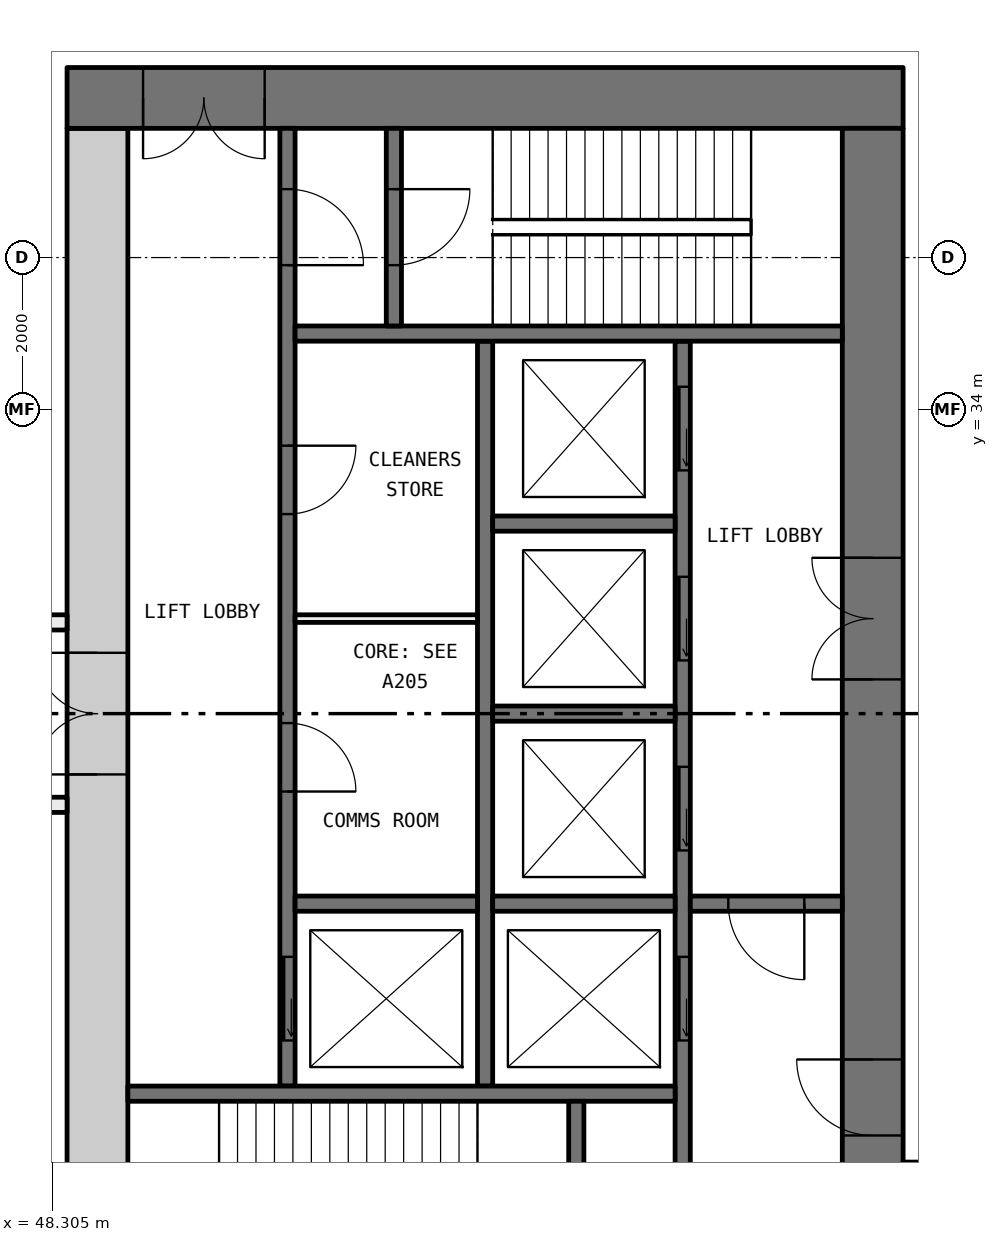
"""IFC4 building model, lengths in metres.
Left out: names, types, materials, properties, quantities, classifications, styles, units other than length and angle.
Written with IfcOpenShell. Run it as: python <this file> out.ifc"""

import sys

from ifc_helpers import new_model, si_unit, direction, frame, frame_2d, origin, place, context, subcontext, project, spatial, rectangle, extrude, element, fill, save


model = new_model("IFC4")
c1 = context("Model", 3, precision=1e-05, world=origin(), true_north=direction((0.0, 1.0)))
c2 = subcontext(c1, "Body", "Model", "MODEL_VIEW")
j1 = project(units=[si_unit("LENGTHUNIT", "METRE"), si_unit("PLANEANGLEUNIT", "RADIAN")], contexts=[c1])
p1 = place(None, origin())
s1 = spatial("IfcSite", under=j1, at=p1, CompositionType="ELEMENT")
p2 = place(p1, origin())
s2 = spatial("IfcBuilding", under=s1, at=p2, CompositionType="ELEMENT")
p3 = place(p2, frame((0.0, 0.0, 24.0)))
s3 = spatial("IfcBuildingStorey", under=s2, at=p3, CompositionType="ELEMENT", Elevation=24.0)
p4 = place(p3, frame((42.0, 28.8, 0.0), z_axis=(0.0, 0.0, 1.0), x_axis=(1.0, 0.0, 0.0)))
e1 = element("IfcWall", 1, at=p4, inside=s3, PredefinedType="PARTITIONING", context=c2, shape_type="SweptSolid", body=[
    extrude(rectangle(XDim=6.5, YDim=0.2, at=frame_2d((3.25, 0.0))), origin(), (0.0, 0.0, 1.0), 5.6),
])
p5 = place(p4, frame((2.65, 0.0, 0.0)))
e2 = element("IfcOpeningElement", 2, at=p5, cuts=e1, PredefinedType="OPENING", context=c2, shape_type="SweptSolid", body=[
    extrude(rectangle(XDim=1.2, YDim=2.1, at=frame_2d((0.6, 1.05))), frame((0.0, 0.11, 0.0), z_axis=(0.0, -1.0, 0.0), x_axis=(1.0, 0.0, 0.0)), (0.0, 0.0, 1.0), 0.22),
])
p6 = place(p3, frame((48.5, 31.2, 0.0), z_axis=(0.0, 0.0, 1.0), x_axis=(-1.0, 0.0, 0.0)))
e3 = element("IfcWall", 3, at=p6, inside=s3, PredefinedType="PARTITIONING", context=c2, shape_type="SweptSolid", body=[
    extrude(rectangle(XDim=6.5, YDim=0.2, at=frame_2d((3.25, 0.0))), origin(), (0.0, 0.0, 1.0), 5.6),
])
p7 = place(p6, frame((2.65, 0.0, 0.0)))
e4 = element("IfcOpeningElement", 4, at=p7, cuts=e3, PredefinedType="OPENING", context=c2, shape_type="SweptSolid", body=[
    extrude(rectangle(XDim=1.2, YDim=2.1, at=frame_2d((0.6, 1.05))), frame((0.0, 0.11, 0.0), z_axis=(0.0, -1.0, 0.0), x_axis=(1.0, 0.0, 0.0)), (0.0, 0.0, 1.0), 0.22),
])
p8 = place(p3, frame((59.5, 38.1, 0.0), z_axis=(0.0, 0.0, 1.0), x_axis=(-1.0, 0.0, 0.0)))
e5 = element("IfcWall", 5, at=p8, inside=s3, PredefinedType="SHEAR", context=c2, shape_type="SweptSolid", body=[
    extrude(rectangle(XDim=11.0, YDim=0.8, at=frame_2d((5.5, 0.0))), origin(), (0.0, 0.0, 1.0), 5.6),
])
p9 = place(p8, frame((8.4, 0.0, 0.0)))
e6 = element("IfcOpeningElement", 6, at=p9, cuts=e5, PredefinedType="OPENING", context=c2, shape_type="SweptSolid", body=[
    extrude(rectangle(XDim=1.6, YDim=2.1, at=frame_2d((0.8, 1.05))), frame((0.0, 0.41, 0.0), z_axis=(0.0, -1.0, 0.0), x_axis=(1.0, 0.0, 0.0)), (0.0, 0.0, 1.0), 0.82),
])
p10 = place(p3, frame((59.1, 22.3, 0.0), z_axis=(0.0, 0.0, 1.0), x_axis=(0.0, 1.0, 0.0)))
e7 = element("IfcWall", 7, at=p10, inside=s3, PredefinedType="SHEAR", context=c2, shape_type="SweptSolid", body=[
    extrude(rectangle(XDim=15.4, YDim=0.8, at=frame_2d((7.7, 0.0))), origin(), (0.0, 0.0, 1.0), 5.6),
])
p11 = place(p10, frame((8.15, 0.0, 0.0)))
e8 = element("IfcOpeningElement", 8, at=p11, cuts=e7, PredefinedType="OPENING", context=c2, shape_type="SweptSolid", body=[
    extrude(rectangle(XDim=1.6, YDim=2.1, at=frame_2d((0.8, 1.05))), frame((0.0, 0.41, 0.0), z_axis=(0.0, -1.0, 0.0), x_axis=(1.0, 0.0, 0.0)), (0.0, 0.0, 1.0), 0.82),
])
p12 = place(p10, frame((2.15, 0.0, 0.0)))
e9 = element("IfcOpeningElement", 9, at=p12, cuts=e7, PredefinedType="OPENING", context=c2, shape_type="SweptSolid", body=[
    extrude(rectangle(XDim=1.0, YDim=2.1, at=frame_2d((0.5, 1.05))), frame((0.0, 0.41, 0.0), z_axis=(0.0, -1.0, 0.0), x_axis=(1.0, 0.0, 0.0)), (0.0, 0.0, 1.0), 0.82),
])
p13 = place(p3, frame((48.9, 22.3, 0.0), z_axis=(0.0, 0.0, 1.0), x_axis=(0.0, 1.0, 0.0)))
e10 = element("IfcWall", 10, at=p13, inside=s3, PredefinedType="SHEAR", context=c2, shape_type="SweptSolid", body=[
    extrude(rectangle(XDim=15.4, YDim=0.8, at=frame_2d((7.7, 0.0))), origin(), (0.0, 0.0, 1.0), 5.6),
])
p14 = place(p13, frame((6.9, 0.0, 0.0)))
e11 = element("IfcOpeningElement", 11, at=p14, cuts=e10, PredefinedType="OPENING", context=c2, shape_type="SweptSolid", body=[
    extrude(rectangle(XDim=1.6, YDim=2.1, at=frame_2d((0.8, 1.05))), frame((0.0, 0.41, 0.0), z_axis=(0.0, -1.0, 0.0), x_axis=(1.0, 0.0, 0.0)), (0.0, 0.0, 1.0), 0.82),
])
p15 = place(p3, frame((56.6, 22.3, 0.0), z_axis=(0.0, 0.0, 1.0), x_axis=(0.0, 1.0, 0.0)))
e12 = element("IfcWall", 12, at=p15, inside=s3, PredefinedType="SOLIDWALL", context=c2, shape_type="SweptSolid", body=[
    extrude(rectangle(XDim=12.6, YDim=0.2, at=frame_2d((6.3, 0.0))), origin(), (0.0, 0.0, 1.0), 5.6),
])
p16 = place(p15, frame((3.4, 0.0, 0.0)))
e13 = element("IfcOpeningElement", 13, at=p16, cuts=e12, PredefinedType="OPENING", context=c2, shape_type="SweptSolid", body=[
    extrude(rectangle(XDim=1.1, YDim=2.1, at=frame_2d((0.55, 1.05))), frame((0.0, 0.11, 0.0), z_axis=(0.0, -1.0, 0.0), x_axis=(1.0, 0.0, 0.0)), (0.0, 0.0, 1.0), 0.22),
])
p17 = place(p15, frame((5.9, 0.0, 0.0)))
e14 = element("IfcOpeningElement", 14, at=p17, cuts=e12, PredefinedType="OPENING", context=c2, shape_type="SweptSolid", body=[
    extrude(rectangle(XDim=1.1, YDim=2.1, at=frame_2d((0.55, 1.05))), frame((0.0, 0.11, 0.0), z_axis=(0.0, -1.0, 0.0), x_axis=(1.0, 0.0, 0.0)), (0.0, 0.0, 1.0), 0.22),
])
p18 = place(p15, frame((8.4, 0.0, 0.0)))
e15 = element("IfcOpeningElement", 15, at=p18, cuts=e12, PredefinedType="OPENING", context=c2, shape_type="SweptSolid", body=[
    extrude(rectangle(XDim=1.1, YDim=2.1, at=frame_2d((0.55, 1.05))), frame((0.0, 0.11, 0.0), z_axis=(0.0, -1.0, 0.0), x_axis=(1.0, 0.0, 0.0)), (0.0, 0.0, 1.0), 0.22),
])
p19 = place(p15, frame((10.9, 0.0, 0.0)))
e16 = element("IfcOpeningElement", 16, at=p19, cuts=e12, PredefinedType="OPENING", context=c2, shape_type="SweptSolid", body=[
    extrude(rectangle(XDim=1.1, YDim=2.1, at=frame_2d((0.55, 1.05))), frame((0.0, 0.11, 0.0), z_axis=(0.0, -1.0, 0.0), x_axis=(1.0, 0.0, 0.0)), (0.0, 0.0, 1.0), 0.22),
])
p20 = place(p15, frame((0.15, 0.0, 0.0)))
e17 = element("IfcOpeningElement", 17, at=p20, cuts=e12, PredefinedType="OPENING", context=c2, shape_type="SweptSolid", body=[
    extrude(rectangle(XDim=1.0, YDim=2.1, at=frame_2d((0.5, 1.05))), frame((0.0, 0.11, 0.0), z_axis=(0.0, -1.0, 0.0), x_axis=(1.0, 0.0, 0.0)), (0.0, 0.0, 1.0), 0.22),
])
p21 = place(p3, frame((51.4, 25.1, 0.0), z_axis=(0.0, 0.0, 1.0), x_axis=(0.0, 1.0, 0.0)))
e18 = element("IfcWall", 18, at=p21, inside=s3, PredefinedType="SOLIDWALL", context=c2, shape_type="SweptSolid", body=[
    extrude(rectangle(XDim=12.6, YDim=0.2, at=frame_2d((6.3, 0.0))), origin(), (0.0, 0.0, 1.0), 5.6),
])
p22 = place(p21, frame((0.6, 0.0, 0.0)))
e19 = element("IfcOpeningElement", 19, at=p22, cuts=e18, PredefinedType="OPENING", context=c2, shape_type="SweptSolid", body=[
    extrude(rectangle(XDim=1.1, YDim=2.1, at=frame_2d((0.55, 1.05))), frame((0.0, 0.11, 0.0), z_axis=(0.0, -1.0, 0.0), x_axis=(1.0, 0.0, 0.0)), (0.0, 0.0, 1.0), 0.22),
])
p23 = place(p21, frame((10.8, 0.0, 0.0)))
e20 = element("IfcOpeningElement", 20, at=p23, cuts=e18, PredefinedType="OPENING", context=c2, shape_type="SweptSolid", body=[
    extrude(rectangle(XDim=1.0, YDim=2.1, at=frame_2d((0.5, 1.05))), frame((0.0, 0.11, 0.0), z_axis=(0.0, -1.0, 0.0), x_axis=(1.0, 0.0, 0.0)), (0.0, 0.0, 1.0), 0.22),
])
p24 = place(p21, frame((3.875, 0.0, 0.0)))
e21 = element("IfcOpeningElement", 21, at=p24, cuts=e18, PredefinedType="OPENING", context=c2, shape_type="SweptSolid", body=[
    extrude(rectangle(XDim=0.9, YDim=2.1, at=frame_2d((0.45, 1.05))), frame((0.0, 0.11, 0.0), z_axis=(0.0, -1.0, 0.0), x_axis=(1.0, 0.0, 0.0)), (0.0, 0.0, 1.0), 0.22),
])
p25 = place(p21, frame((7.525, 0.0, 0.0)))
e22 = element("IfcOpeningElement", 22, at=p25, cuts=e18, PredefinedType="OPENING", context=c2, shape_type="SweptSolid", body=[
    extrude(rectangle(XDim=0.9, YDim=2.1, at=frame_2d((0.45, 1.05))), frame((0.0, 0.11, 0.0), z_axis=(0.0, -1.0, 0.0), x_axis=(1.0, 0.0, 0.0)), (0.0, 0.0, 1.0), 0.22),
])
p26 = place(p3, frame((54.0, 25.1, 0.0), z_axis=(0.0, 0.0, 1.0), x_axis=(0.0, 1.0, 0.0)))
e23 = element("IfcWall", 23, at=p26, inside=s3, PredefinedType="SOLIDWALL", context=c2, shape_type="SweptSolid", body=[
    extrude(rectangle(XDim=9.8, YDim=0.2, at=frame_2d((4.9, 0.0))), origin(), (0.0, 0.0, 1.0), 5.6),
])
for number, where, z_axis, x_axis in (
    (24, (56.5, 25.0, 0.0), (0.0, 0.0, 1.0), (-1.0, 0.0, 0.0)),
    (25, (58.7, 35.0, 0.0), (0.0, 0.0, 1.0), (-1.0, 0.0, 0.0)),
):
    element("IfcWall", number, at=place(p3, frame(where, z_axis=z_axis, x_axis=x_axis)), inside=s3, PredefinedType="SOLIDWALL", context=c2, shape_type="SweptSolid", body=[
        extrude(rectangle(XDim=7.2, YDim=0.2, at=frame_2d((3.6, 0.0))), origin(), (0.0, 0.0, 1.0), 5.6),
    ])
p27 = place(p3, frame((58.7, 27.5, 0.0), z_axis=(0.0, 0.0, 1.0), x_axis=(-1.0, 0.0, 0.0)))
e26 = element("IfcWall", 26, at=p27, inside=s3, PredefinedType="SOLIDWALL", context=c2, shape_type="SweptSolid", body=[
    extrude(rectangle(XDim=2.0, YDim=0.2, at=frame_2d((1.0, 0.0))), origin(), (0.0, 0.0, 1.0), 5.6),
])
p28 = place(p27, frame((0.5, 0.0, 0.0)))
e27 = element("IfcOpeningElement", 27, at=p28, cuts=e26, PredefinedType="OPENING", context=c2, shape_type="SweptSolid", body=[
    extrude(rectangle(XDim=1.0, YDim=2.1, at=frame_2d((0.5, 1.05))), frame((0.0, 0.11, 0.0), z_axis=(0.0, -1.0, 0.0), x_axis=(1.0, 0.0, 0.0)), (0.0, 0.0, 1.0), 0.22),
])
p29 = place(p3, frame((55.2, 22.3, 0.0), z_axis=(0.0, 0.0, 1.0), x_axis=(0.0, 1.0, 0.0)))
e28 = element("IfcWall", 28, at=p29, inside=s3, PredefinedType="SOLIDWALL", context=c2, shape_type="SweptSolid", body=[
    extrude(rectangle(XDim=2.6, YDim=0.2, at=frame_2d((1.3, 0.0))), origin(), (0.0, 0.0, 1.0), 5.6),
])
p30 = place(p29, frame((0.15, 0.0, 0.0)))
e29 = element("IfcOpeningElement", 29, at=p30, cuts=e28, PredefinedType="OPENING", context=c2, shape_type="SweptSolid", body=[
    extrude(rectangle(XDim=1.0, YDim=2.1, at=frame_2d((0.5, 1.05))), frame((0.0, 0.11, 0.0), z_axis=(0.0, -1.0, 0.0), x_axis=(1.0, 0.0, 0.0)), (0.0, 0.0, 1.0), 0.22),
])
p31 = place(p3, frame((52.8, 35.1, 0.0), z_axis=(0.0, 0.0, 1.0), x_axis=(0.0, 1.0, 0.0)))
e30 = element("IfcWall", 30, at=p31, inside=s3, PredefinedType="SOLIDWALL", context=c2, shape_type="SweptSolid", body=[
    extrude(rectangle(XDim=2.6, YDim=0.2, at=frame_2d((1.3, 0.0))), origin(), (0.0, 0.0, 1.0), 5.6),
])
p32 = place(p31, frame((0.8, 0.0, 0.0)))
e31 = element("IfcOpeningElement", 31, at=p32, cuts=e30, PredefinedType="OPENING", context=c2, shape_type="SweptSolid", body=[
    extrude(rectangle(XDim=1.0, YDim=2.1, at=frame_2d((0.5, 1.05))), frame((0.0, 0.11, 0.0), z_axis=(0.0, -1.0, 0.0), x_axis=(1.0, 0.0, 0.0)), (0.0, 0.0, 1.0), 0.22),
])
for number, where, z_axis, x_axis in (
    (32, (56.5, 27.5, 0.0), (0.0, 0.0, 1.0), (-1.0, 0.0, 0.0)),
    (33, (56.5, 30.0, 0.0), (0.0, 0.0, 1.0), (-1.0, 0.0, 0.0)),
    (34, (56.5, 32.5, 0.0), (0.0, 0.0, 1.0), (-1.0, 0.0, 0.0)),
    (35, (53.9, 27.5, 0.0), (0.0, 0.0, 1.0), (-1.0, 0.0, 0.0)),
):
    element("IfcWall", number, at=place(p3, frame(where, z_axis=z_axis, x_axis=x_axis)), inside=s3, PredefinedType="SOLIDWALL", context=c2, shape_type="SweptSolid", body=[
        extrude(rectangle(XDim=2.4, YDim=0.2, at=frame_2d((1.2, 0.0))), origin(), (0.0, 0.0, 1.0), 5.6),
    ])
p33 = place(p3, frame((53.9, 31.25, 0.0), z_axis=(0.0, 0.0, 1.0), x_axis=(-1.0, 0.0, 0.0)))
e36 = element("IfcWall", 36, at=p33, inside=s3, PredefinedType="PARTITIONING", context=c2, shape_type="SweptSolid", body=[
    extrude(rectangle(XDim=2.4, YDim=0.1, at=frame_2d((1.2, 0.0))), origin(), (0.0, 0.0, 1.0), 5.6),
])
p34 = place(p22, origin())
e37 = element("IfcDoor", 37, at=p34, inside=s3, OperationType="SLIDING_TO_LEFT", PredefinedType="DOOR", context=c2, shape_type="SweptSolid", body=[
    extrude(rectangle(XDim=1.1, YDim=2.1, at=frame_2d((0.55, 1.05))), frame((0.0, 0.025, 0.0), z_axis=(0.0, -1.0, 0.0), x_axis=(1.0, 0.0, 0.0)), (0.0, 0.0, 1.0), 0.05),
])
fill(e19, e37)
p35 = place(p16, origin())
e38 = element("IfcDoor", 38, at=p35, inside=s3, OperationType="SLIDING_TO_LEFT", PredefinedType="DOOR", context=c2, shape_type="SweptSolid", body=[
    extrude(rectangle(XDim=1.1, YDim=2.1, at=frame_2d((0.55, 1.05))), frame((0.0, 0.025, 0.0), z_axis=(0.0, -1.0, 0.0), x_axis=(1.0, 0.0, 0.0)), (0.0, 0.0, 1.0), 0.05),
])
fill(e13, e38)
p36 = place(p17, origin())
e39 = element("IfcDoor", 39, at=p36, inside=s3, OperationType="SLIDING_TO_LEFT", PredefinedType="DOOR", context=c2, shape_type="SweptSolid", body=[
    extrude(rectangle(XDim=1.1, YDim=2.1, at=frame_2d((0.55, 1.05))), frame((0.0, 0.025, 0.0), z_axis=(0.0, -1.0, 0.0), x_axis=(1.0, 0.0, 0.0)), (0.0, 0.0, 1.0), 0.05),
])
fill(e14, e39)
p37 = place(p18, origin())
e40 = element("IfcDoor", 40, at=p37, inside=s3, OperationType="SLIDING_TO_LEFT", PredefinedType="DOOR", context=c2, shape_type="SweptSolid", body=[
    extrude(rectangle(XDim=1.1, YDim=2.1, at=frame_2d((0.55, 1.05))), frame((0.0, 0.025, 0.0), z_axis=(0.0, -1.0, 0.0), x_axis=(1.0, 0.0, 0.0)), (0.0, 0.0, 1.0), 0.05),
])
fill(e15, e40)
p38 = place(p19, origin())
e41 = element("IfcDoor", 41, at=p38, inside=s3, OperationType="SLIDING_TO_LEFT", PredefinedType="DOOR", context=c2, shape_type="SweptSolid", body=[
    extrude(rectangle(XDim=1.1, YDim=2.1, at=frame_2d((0.55, 1.05))), frame((0.0, 0.025, 0.0), z_axis=(0.0, -1.0, 0.0), x_axis=(1.0, 0.0, 0.0)), (0.0, 0.0, 1.0), 0.05),
])
fill(e16, e41)
p39 = place(p23, frame((1.0, 0.0, 0.0), x_axis=(-1.0, 0.0, 0.0)))
e42 = element("IfcDoor", 42, at=p39, inside=s3, OperationType="SINGLE_SWING_LEFT", PredefinedType="DOOR", context=c2, shape_type="SweptSolid", body=[
    extrude(rectangle(XDim=1.0, YDim=2.1, at=frame_2d((0.5, 1.05))), frame((0.0, 0.025, 0.0), z_axis=(0.0, -1.0, 0.0), x_axis=(1.0, 0.0, 0.0)), (0.0, 0.0, 1.0), 0.05),
])
fill(e20, e42)
p40 = place(p32, frame((1.0, 0.0, 0.0), x_axis=(-1.0, 0.0, 0.0)))
e43 = element("IfcDoor", 43, at=p40, inside=s3, OperationType="SINGLE_SWING_RIGHT", PredefinedType="DOOR", context=c2, shape_type="SweptSolid", body=[
    extrude(rectangle(XDim=1.0, YDim=2.1, at=frame_2d((0.5, 1.05))), frame((0.0, 0.025, 0.0), z_axis=(0.0, -1.0, 0.0), x_axis=(1.0, 0.0, 0.0)), (0.0, 0.0, 1.0), 0.05),
])
fill(e31, e43)
p41 = place(p28, origin())
e44 = element("IfcDoor", 44, at=p41, inside=s3, OperationType="SINGLE_SWING_RIGHT", PredefinedType="DOOR", context=c2, shape_type="SweptSolid", body=[
    extrude(rectangle(XDim=1.0, YDim=2.1, at=frame_2d((0.5, 1.05))), frame((0.0, 0.025, 0.0), z_axis=(0.0, -1.0, 0.0), x_axis=(1.0, 0.0, 0.0)), (0.0, 0.0, 1.0), 0.05),
])
fill(e27, e44)
p42 = place(p11, origin())
e45 = element("IfcDoor", 45, at=p42, inside=s3, OperationType="DOUBLE_DOOR_SINGLE_SWING", PredefinedType="DOOR", context=c2, shape_type="SweptSolid", body=[
    extrude(rectangle(XDim=1.6, YDim=2.1, at=frame_2d((0.8, 1.05))), frame((0.0, 0.025, 0.0), z_axis=(0.0, -1.0, 0.0), x_axis=(1.0, 0.0, 0.0)), (0.0, 0.0, 1.0), 0.05),
])
fill(e8, e45)
p43 = place(p12, origin())
e46 = element("IfcDoor", 46, at=p43, inside=s3, OperationType="SINGLE_SWING_LEFT", PredefinedType="DOOR", context=c2, shape_type="SweptSolid", body=[
    extrude(rectangle(XDim=1.0, YDim=2.1, at=frame_2d((0.5, 1.05))), frame((0.0, 0.025, 0.0), z_axis=(0.0, -1.0, 0.0), x_axis=(1.0, 0.0, 0.0)), (0.0, 0.0, 1.0), 0.05),
])
fill(e9, e46)
p44 = place(p9, origin())
e47 = element("IfcDoor", 47, at=p44, inside=s3, OperationType="DOUBLE_DOOR_SINGLE_SWING", PredefinedType="DOOR", context=c2, shape_type="SweptSolid", body=[
    extrude(rectangle(XDim=1.6, YDim=2.1, at=frame_2d((0.8, 1.05))), frame((0.0, 0.025, 0.0), z_axis=(0.0, -1.0, 0.0), x_axis=(1.0, 0.0, 0.0)), (0.0, 0.0, 1.0), 0.05),
])
fill(e6, e47)
p45 = place(p14, origin())
e48 = element("IfcDoor", 48, at=p45, inside=s3, OperationType="DOUBLE_DOOR_SINGLE_SWING", PredefinedType="DOOR", context=c2, shape_type="SweptSolid", body=[
    extrude(rectangle(XDim=1.6, YDim=2.1, at=frame_2d((0.8, 1.05))), frame((0.0, 0.025, 0.0), z_axis=(0.0, -1.0, 0.0), x_axis=(1.0, 0.0, 0.0)), (0.0, 0.0, 1.0), 0.05),
])
fill(e11, e48)
p46 = place(p24, frame((0.9, 0.0, 0.0), x_axis=(-1.0, 0.0, 0.0)))
e49 = element("IfcDoor", 49, at=p46, inside=s3, OperationType="SINGLE_SWING_LEFT", PredefinedType="DOOR", context=c2, shape_type="SweptSolid", body=[
    extrude(rectangle(XDim=0.9, YDim=2.1, at=frame_2d((0.45, 1.05))), frame((0.0, 0.025, 0.0), z_axis=(0.0, -1.0, 0.0), x_axis=(1.0, 0.0, 0.0)), (0.0, 0.0, 1.0), 0.05),
])
fill(e21, e49)
p47 = place(p25, frame((0.9, 0.0, 0.0), x_axis=(-1.0, 0.0, 0.0)))
e50 = element("IfcDoor", 50, at=p47, inside=s3, OperationType="SINGLE_SWING_RIGHT", PredefinedType="DOOR", context=c2, shape_type="SweptSolid", body=[
    extrude(rectangle(XDim=0.9, YDim=2.1, at=frame_2d((0.45, 1.05))), frame((0.0, 0.025, 0.0), z_axis=(0.0, -1.0, 0.0), x_axis=(1.0, 0.0, 0.0)), (0.0, 0.0, 1.0), 0.05),
])
fill(e22, e50)
save(model, sys.argv[1])
